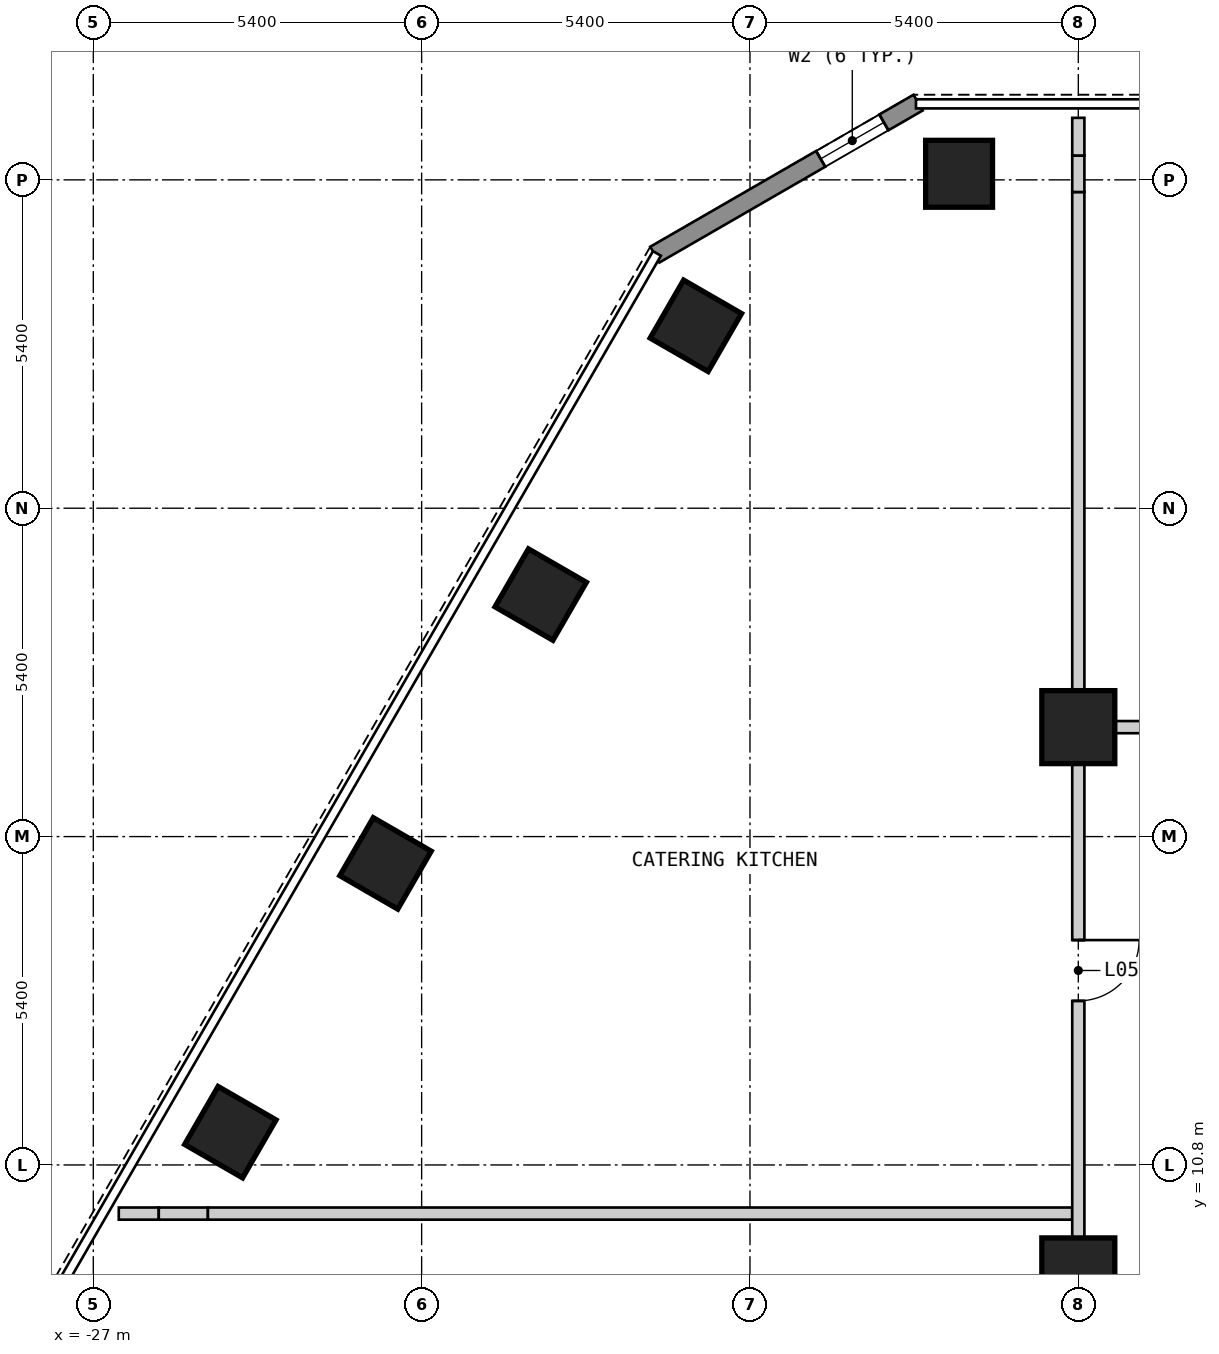
"""IFC4 building model, lengths in metres.
Left out: names, types, materials, properties, quantities, classifications, styles, units other than length and angle.
Written with IfcOpenShell. Run it as: python <this file> out.ifc"""

import sys

from ifc_helpers import new_model, si_unit, direction, frame, frame_2d, origin, origin_2d, place, context, subcontext, project, spatial, polyline, rectangle, outline, extrude, element, fill, save


model = new_model("IFC4")
c1 = context("Model", 3, precision=1e-05, world=origin(), true_north=direction((0.0, 1.0)))
c2 = subcontext(c1, "Body", "Model", "MODEL_VIEW")
j1 = project(units=[si_unit("LENGTHUNIT", "METRE"), si_unit("PLANEANGLEUNIT", "RADIAN")], contexts=[c1])
p1 = place(None, origin())
s1 = spatial("IfcSite", under=j1, at=p1, CompositionType="ELEMENT")
p2 = place(p1, origin())
s2 = spatial("IfcBuilding", under=s1, at=p2, CompositionType="ELEMENT")
p3 = place(p2, frame((0.0, 0.0, 19.8)))
s3 = spatial("IfcBuildingStorey", under=s2, at=p3, CompositionType="ELEMENT", Elevation=19.8)
for number, where, z_axis, x_axis in (
    (1, (-12.761, 27.1, 0.0), (0.0, 0.0, 1.0), (-1.0, 0.0, 0.0)),
    (2, (-17.09, 24.6, 0.0), (0.0, 0.0, 1.0), (-0.5, -0.866, 0.0)),
    (3, (-19.642, 20.18, 0.0), (0.0, 0.0, 1.0), (-0.5, -0.866, 0.0)),
    (4, (-22.194, 15.759, 0.0), (0.0, 0.0, 1.0), (-0.5, -0.866, 0.0)),
    (5, (-24.746, 11.339, 0.0), (0.0, 0.0, 1.0), (-0.5, -0.866, 0.0)),
):
    element("IfcColumn", number, at=place(p3, frame(where, z_axis=z_axis, x_axis=x_axis)), inside=s3, PredefinedType="COLUMN", context=c2, shape_type="SweptSolid", body=[
        extrude(rectangle(XDim=1.1, YDim=1.1, at=origin_2d()), origin(), (0.0, 0.0, 1.0), 3.6),
    ])
for number, where, z_axis, x_axis in (
    (6, (-10.8, 9.0, 0.0), (0.0, 0.0, 1.0), (1.0, 0.0, 0.0)),
    (7, (-10.8, 18.0, 0.0), (0.0, 0.0, 1.0), (1.0, 0.0, 0.0)),
):
    element("IfcColumn", number, at=place(p3, frame(where, z_axis=z_axis, x_axis=x_axis)), inside=s3, PredefinedType="COLUMN", context=c2, shape_type="SweptSolid", body=[
        extrude(rectangle(XDim=1.2, YDim=1.2, at=origin_2d()), origin(), (0.0, 0.0, 1.0), 3.6),
    ])
p4 = place(p3, frame((-13.435, 28.27, 0.0), z_axis=(0.0, 0.0, 1.0), x_axis=(-0.866010750942, -0.50002537861, 0.0)))
e8 = element("IfcWall", 8, at=p4, inside=s3, PredefinedType="SOLIDWALL", context=c2, shape_type="SweptSolid", body=[
    extrude(outline(polyline([(0.0, -0.15), (5.0, -0.15), (4.919, 0.15), (0.08, 0.15), (0.0, -0.15)])), origin(), (0.0, 0.0, 1.0), 2.8),
])
p5 = place(p4, frame((0.65, 0.0, 0.15)))
e9 = element("IfcOpeningElement", 9, at=p5, cuts=e8, PredefinedType="OPENING", context=c2, shape_type="SweptSolid", body=[
    extrude(rectangle(XDim=1.2, YDim=2.1, at=frame_2d((0.6, 1.05))), frame((0.0, 0.16, 0.0), z_axis=(0.0, -1.0, 0.0), x_axis=(1.0, 0.0, 0.0)), (0.0, 0.0, 1.0), 0.32),
])
p6 = place(p3, frame((-26.581, 10.0, 0.0), z_axis=(0.0, 0.0, 1.0), x_axis=(1.0, 0.0, 0.0)))
e10 = element("IfcWall", 10, at=p6, inside=s3, PredefinedType="PARTITIONING", context=c2, shape_type="SweptSolid", body=[
    extrude(rectangle(XDim=0.658, YDim=0.2, at=frame_2d((0.329, 0.0))), origin(), (0.0, 0.0, 1.0), 2.8),
])
p7 = place(p3, frame((-25.923, 10.0, 0.0), z_axis=(0.0, 0.0, 1.0), x_axis=(1.0, 0.0, 0.0)))
e11 = element("IfcWall", 11, at=p7, inside=s3, PredefinedType="PARTITIONING", context=c2, shape_type="SweptSolid", body=[
    extrude(rectangle(XDim=0.808, YDim=0.2, at=frame_2d((0.404, 0.0))), origin(), (0.0, 0.0, 1.0), 2.07),
])
p8 = place(p3, frame((-25.115, 10.0, 0.0), z_axis=(0.0, 0.0, 1.0), x_axis=(1.0, 0.0, 0.0)))
e12 = element("IfcWall", 12, at=p8, inside=s3, PredefinedType="PARTITIONING", context=c2, shape_type="SweptSolid", body=[
    extrude(rectangle(XDim=14.215, YDim=0.2, at=frame_2d((7.107, 0.0))), origin(), (0.0, 0.0, 1.0), 2.8),
])
p9 = place(p3, frame((-10.7, 18.0, 0.0), z_axis=(0.0, 0.0, 1.0), x_axis=(1.0, 0.0, 0.0)))
e13 = element("IfcWall", 13, at=p9, inside=s3, PredefinedType="PARTITIONING", context=c2, shape_type="SweptSolid", body=[
    extrude(rectangle(XDim=21.4, YDim=0.2, at=frame_2d((10.7, 0.0))), origin(), (0.0, 0.0, 1.0), 2.8),
])
p10 = place(p9, frame((8.86, 0.0, 0.0)))
e14 = element("IfcOpeningElement", 14, at=p10, cuts=e13, PredefinedType="OPENING", context=c2, shape_type="SweptSolid", body=[
    extrude(rectangle(XDim=1.0, YDim=2.1, at=frame_2d((0.5, 1.05))), frame((0.0, 0.11, 0.0), z_axis=(0.0, -1.0, 0.0), x_axis=(1.0, 0.0, 0.0)), (0.0, 0.0, 1.0), 0.22),
])
p11 = place(p3, frame((-10.8, 2.1, 0.0), z_axis=(0.0, 0.0, 1.0), x_axis=(0.0, 1.0, 0.0)))
e15 = element("IfcWall", 15, at=p11, inside=s3, PredefinedType="PARTITIONING", context=c2, shape_type="SweptSolid", body=[
    extrude(rectangle(XDim=24.7, YDim=0.2, at=frame_2d((12.35, 0.0))), origin(), (0.0, 0.0, 1.0), 2.8),
])
p12 = place(p11, frame((3.002, 0.0, 0.0)))
e16 = element("IfcOpeningElement", 16, at=p12, cuts=e15, PredefinedType="OPENING", context=c2, shape_type="SweptSolid", body=[
    extrude(rectangle(XDim=1.8, YDim=2.1, at=frame_2d((0.9, 1.05))), frame((0.0, 0.11, 0.0), z_axis=(0.0, -1.0, 0.0), x_axis=(1.0, 0.0, 0.0)), (0.0, 0.0, 1.0), 0.22),
])
p13 = place(p11, frame((11.398, 0.0, 0.0)))
e17 = element("IfcOpeningElement", 17, at=p13, cuts=e15, PredefinedType="OPENING", context=c2, shape_type="SweptSolid", body=[
    extrude(rectangle(XDim=1.0, YDim=2.1, at=frame_2d((0.5, 1.05))), frame((0.0, 0.11, 0.0), z_axis=(0.0, -1.0, 0.0), x_axis=(1.0, 0.0, 0.0)), (0.0, 0.0, 1.0), 0.22),
])
p14 = place(p3, frame((-10.8, 26.8, 0.0), z_axis=(0.0, 0.0, 1.0), x_axis=(0.0, 1.0, 0.0)))
e18 = element("IfcWall", 18, at=p14, inside=s3, PredefinedType="PARTITIONING", context=c2, shape_type="SweptSolid", body=[
    extrude(rectangle(XDim=0.6, YDim=0.2, at=frame_2d((0.3, 0.0))), origin(), (0.0, 0.0, 1.0), 2.07),
])
p15 = place(p3, frame((-10.8, 27.4, 0.0), z_axis=(0.0, 0.0, 1.0), x_axis=(0.0, 1.0, 0.0)))
e19 = element("IfcWall", 19, at=p15, inside=s3, PredefinedType="PARTITIONING", context=c2, shape_type="SweptSolid", body=[
    extrude(rectangle(XDim=0.62, YDim=0.2, at=frame_2d((0.31, 0.0))), origin(), (0.0, 0.0, 1.0), 2.8),
])
p16 = place(p5, origin())
e20 = element("IfcWindow", 20, at=p16, inside=s3, PartitioningType="SINGLE_PANEL", PredefinedType="WINDOW", context=c2, shape_type="SweptSolid", body=[
    extrude(rectangle(XDim=1.2, YDim=2.1, at=frame_2d((0.6, 1.05))), frame((0.0, 0.03, 0.0), z_axis=(0.0, -1.0, 0.0), x_axis=(1.0, 0.0, 0.0)), (0.0, 0.0, 1.0), 0.06),
])
fill(e9, e20)
p17 = place(p13, origin())
e21 = element("IfcDoor", 21, at=p17, inside=s3, OperationType="SINGLE_SWING_RIGHT", PredefinedType="DOOR", context=c2, shape_type="SweptSolid", body=[
    extrude(rectangle(XDim=1.0, YDim=2.1, at=frame_2d((0.5, 1.05))), frame((0.0, 0.025, 0.0), z_axis=(0.0, -1.0, 0.0), x_axis=(1.0, 0.0, 0.0)), (0.0, 0.0, 1.0), 0.05),
])
fill(e17, e21)
save(model, sys.argv[1])
